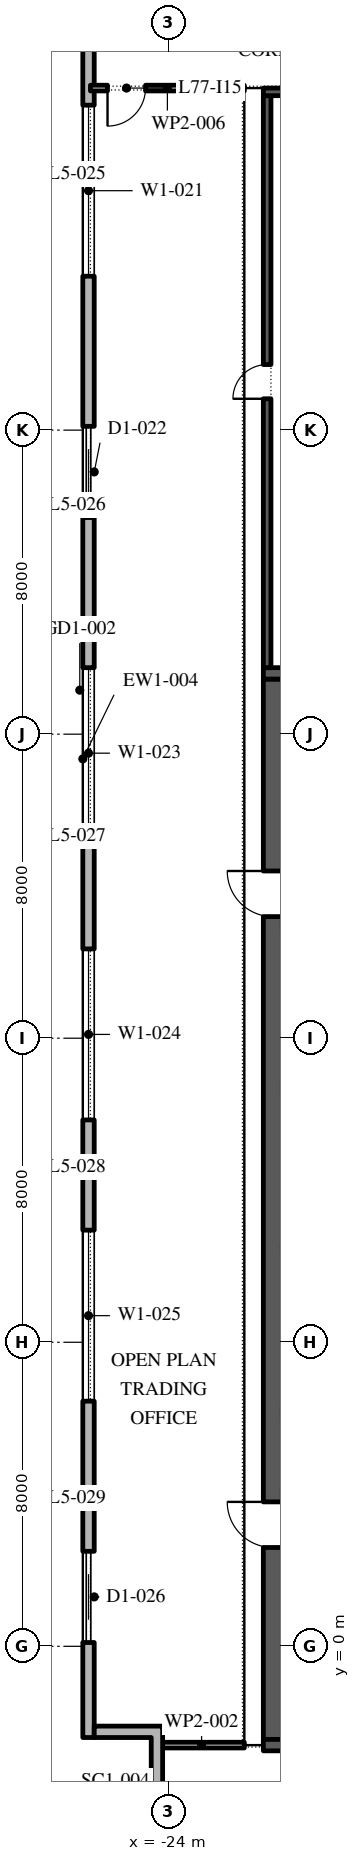
"""IFC4 building model, lengths in metres.
Left out: names, types, materials, properties, quantities, classifications, styles, units other than length and angle.
Written with IfcOpenShell. Run it as: python <this file> out.ifc"""

import sys

from ifc_helpers import new_model, si_unit, direction, frame, frame_2d, origin, place, context, subcontext, project, spatial, polyline, rectangle, outline, extrude, element, fill, save


model = new_model("IFC4")
c1 = context("Model", 3, precision=1e-05, world=origin(), true_north=direction((0.0, 1.0)))
c2 = subcontext(c1, "Body", "Model", "MODEL_VIEW")
j1 = project(units=[si_unit("LENGTHUNIT", "METRE"), si_unit("PLANEANGLEUNIT", "RADIAN")], contexts=[c1])
p1 = place(None, origin())
s1 = spatial("IfcSite", under=j1, at=p1, CompositionType="ELEMENT")
p2 = place(p1, origin())
s2 = spatial("IfcBuilding", under=s1, at=p2, CompositionType="ELEMENT")
p3 = place(p2, frame((0.0, 0.0, 351.0)))
s3 = spatial("IfcBuildingStorey", under=s2, at=p3, CompositionType="ELEMENT", Elevation=351.0)
p4 = place(p3, frame((-26.1, 49.1, 0.0), z_axis=(0.0, 0.0, 1.0), x_axis=(0.0, -1.0, 0.0)))
e1 = element("IfcWall", 1, at=p4, inside=s3, PredefinedType="STANDARD", context=c2, shape_type="SweptSolid", body=[
    extrude(rectangle(XDim=51.5, YDim=0.3, at=frame_2d((25.75, 0.0))), origin(), (0.0, 0.0, 1.0), 4.0),
])
p5 = place(p4, frame((1.3, 0.0, 0.45)))
e2 = element("IfcOpeningElement", 2, at=p5, cuts=e1, PredefinedType="OPENING", context=c2, shape_type="SweptSolid", body=[
    extrude(rectangle(XDim=4.5, YDim=3.05, at=frame_2d((2.25, 1.525))), frame((0.0, 0.16, 0.0), z_axis=(0.0, -1.0, 0.0), x_axis=(1.0, 0.0, 0.0)), (0.0, 0.0, 1.0), 0.32),
])
p6 = place(p4, frame((8.55, 0.0, 0.45)))
e3 = element("IfcOpeningElement", 3, at=p6, cuts=e1, PredefinedType="OPENING", context=c2, shape_type="SweptSolid", body=[
    extrude(rectangle(XDim=4.5, YDim=3.05, at=frame_2d((2.25, 1.525))), frame((0.0, 0.16, 0.0), z_axis=(0.0, -1.0, 0.0), x_axis=(1.0, 0.0, 0.0)), (0.0, 0.0, 1.0), 0.32),
])
p7 = place(p4, frame((17.0, 0.0, 0.0)))
e4 = element("IfcOpeningElement", 4, at=p7, cuts=e1, PredefinedType="OPENING", context=c2, shape_type="SweptSolid", body=[
    extrude(rectangle(XDim=2.4, YDim=3.5, at=frame_2d((1.2, 1.75))), frame((0.0, 0.16, 0.0), z_axis=(0.0, -1.0, 0.0), x_axis=(1.0, 0.0, 0.0)), (0.0, 0.0, 1.0), 0.32),
])
p8 = place(p4, frame((23.35, 0.0, 0.45)))
e5 = element("IfcOpeningElement", 5, at=p8, cuts=e1, PredefinedType="OPENING", context=c2, shape_type="SweptSolid", body=[
    extrude(rectangle(XDim=4.5, YDim=3.05, at=frame_2d((2.25, 1.525))), frame((0.0, 0.16, 0.0), z_axis=(0.0, -1.0, 0.0), x_axis=(1.0, 0.0, 0.0)), (0.0, 0.0, 1.0), 0.32),
])
p9 = place(p4, frame((30.75, 0.0, 0.45)))
e6 = element("IfcOpeningElement", 6, at=p9, cuts=e1, PredefinedType="OPENING", context=c2, shape_type="SweptSolid", body=[
    extrude(rectangle(XDim=4.5, YDim=3.05, at=frame_2d((2.25, 1.525))), frame((0.0, 0.16, 0.0), z_axis=(0.0, -1.0, 0.0), x_axis=(1.0, 0.0, 0.0)), (0.0, 0.0, 1.0), 0.32),
])
p10 = place(p4, frame((38.15, 0.0, 0.45)))
e7 = element("IfcOpeningElement", 7, at=p10, cuts=e1, PredefinedType="OPENING", context=c2, shape_type="SweptSolid", body=[
    extrude(rectangle(XDim=4.5, YDim=3.05, at=frame_2d((2.25, 1.525))), frame((0.0, 0.16, 0.0), z_axis=(0.0, -1.0, 0.0), x_axis=(1.0, 0.0, 0.0)), (0.0, 0.0, 1.0), 0.32),
])
p11 = place(p4, frame((46.6, 0.0, 0.0)))
e8 = element("IfcOpeningElement", 8, at=p11, cuts=e1, PredefinedType="OPENING", context=c2, shape_type="SweptSolid", body=[
    extrude(rectangle(XDim=2.4, YDim=3.5, at=frame_2d((1.2, 1.75))), frame((0.0, 0.16, 0.0), z_axis=(0.0, -1.0, 0.0), x_axis=(1.0, 0.0, 0.0)), (0.0, 0.0, 1.0), 0.32),
])
p12 = place(p3, origin())
e9 = element("IfcWall", 9, at=p12, inside=s3, PredefinedType="STANDARD", context=c2, shape_type="SweptSolid", body=[
    extrude(outline(polyline([(-22.65, -4.2), (-24.45, -4.2), (-24.45, -2.4), (-25.95, -2.4), (-25.95, -2.1), (-24.15, -2.1), (-24.15, -3.9), (-22.35, -3.9), (-22.35, -6.0), (-22.65, -6.0), (-22.65, -4.2)])), origin(), (0.0, 0.0, 1.0), 4.0),
])
p13 = place(p3, frame((-21.25, -2.45, 0.0), z_axis=(0.0, 0.0, 1.0), x_axis=(0.0, 1.0, 0.0)))
e10 = element("IfcWall", 10, at=p13, inside=s3, PredefinedType="SHEAR", context=c2, shape_type="SweptSolid", body=[
    extrude(rectangle(XDim=27.9, YDim=0.5, at=frame_2d((13.95, 0.0))), origin(), (0.0, 0.0, 1.0), 4.0),
])
p14 = place(p13, frame((5.05, 0.0, 0.0)))
e11 = element("IfcOpeningElement", 11, at=p14, cuts=e10, PredefinedType="OPENING", context=c2, shape_type="SweptSolid", body=[
    extrude(rectangle(XDim=1.2, YDim=2.1, at=frame_2d((0.6, 1.05))), frame((0.0, 0.26, 0.0), z_axis=(0.0, -1.0, 0.0), x_axis=(1.0, 0.0, 0.0)), (0.0, 0.0, 1.0), 0.52),
])
p15 = place(p13, frame((21.65, 0.0, 0.0)))
e12 = element("IfcOpeningElement", 12, at=p15, cuts=e10, PredefinedType="OPENING", context=c2, shape_type="SweptSolid", body=[
    extrude(rectangle(XDim=1.2, YDim=2.1, at=frame_2d((0.6, 1.05))), frame((0.0, 0.26, 0.0), z_axis=(0.0, -1.0, 0.0), x_axis=(1.0, 0.0, 0.0)), (0.0, 0.0, 1.0), 0.52),
])
for number, where, z_axis, x_axis in (
    (13, (-21.5, -2.6, 0.0), (0.0, 0.0, 1.0), (1.0, 0.0, 0.0)),
    (14, (-21.5, 25.6, 0.0), (0.0, 0.0, 1.0), (1.0, 0.0, 0.0)),
):
    element("IfcWall", number, at=place(p3, frame(where, z_axis=z_axis, x_axis=x_axis)), inside=s3, PredefinedType="SHEAR", context=c2, shape_type="SweptSolid", body=[
        extrude(rectangle(XDim=11.0, YDim=0.3, at=frame_2d((5.5, 0.0))), origin(), (0.0, 0.0, 1.0), 4.0),
    ])
p16 = place(p3, frame((-21.4, 25.75, 0.0), z_axis=(0.0, 0.0, 1.0), x_axis=(0.0, 1.0, 0.0)))
e15 = element("IfcWall", 15, at=p16, inside=s3, PredefinedType="SHEAR", context=c2, shape_type="SweptSolid", body=[
    extrude(rectangle(XDim=15.05, YDim=0.2, at=frame_2d((7.525, 0.0))), origin(), (0.0, 0.0, 1.0), 4.0),
])
p17 = place(p16, frame((7.075, 0.0, 0.0)))
e16 = element("IfcOpeningElement", 16, at=p17, cuts=e15, PredefinedType="OPENING", context=c2, shape_type="SweptSolid", body=[
    extrude(rectangle(XDim=0.9, YDim=2.1, at=frame_2d((0.45, 1.05))), frame((0.0, 0.11, 0.0), z_axis=(0.0, -1.0, 0.0), x_axis=(1.0, 0.0, 0.0)), (0.0, 0.0, 1.0), 0.22),
])
p18 = place(p3, frame((-21.5, 40.9, 0.0), z_axis=(0.0, 0.0, 1.0), x_axis=(1.0, 0.0, 0.0)))
e17 = element("IfcWall", 17, at=p18, inside=s3, PredefinedType="SHEAR", context=c2, shape_type="SweptSolid", body=[
    extrude(rectangle(XDim=11.0, YDim=0.2, at=frame_2d((5.5, 0.0))), origin(), (0.0, 0.0, 1.0), 4.0),
])
p19 = place(p3, frame((-24.25, -2.6, 0.0), z_axis=(0.0, 0.0, 1.0), x_axis=(1.0, 0.0, 0.0)))
e18 = element("IfcWall", 18, at=p19, inside=s3, PredefinedType="PARTITIONING", context=c2, shape_type="SweptSolid", body=[
    extrude(rectangle(XDim=2.25, YDim=0.15, at=frame_2d((1.125, 0.0))), origin(), (0.0, 0.0, 1.0), 4.0),
])
p20 = place(p3, frame((-22.0, 41.0, 0.0), z_axis=(0.0, 0.0, 1.0), x_axis=(-1.0, 0.0, 0.0)))
e19 = element("IfcWall", 19, at=p20, inside=s3, PredefinedType="PARTITIONING", context=c2, shape_type="SweptSolid", body=[
    extrude(rectangle(XDim=4.05, YDim=0.15, at=frame_2d((2.025, 0.0))), origin(), (0.0, 0.0, 1.0), 4.0),
])
p21 = place(p20, frame((2.6, 0.0, 0.0)))
e20 = element("IfcOpeningElement", 20, at=p21, cuts=e19, PredefinedType="OPENING", context=c2, shape_type="SweptSolid", body=[
    extrude(rectangle(XDim=1.0, YDim=2.1, at=frame_2d((0.5, 1.05))), frame((0.0, 0.085, 0.0), z_axis=(0.0, -1.0, 0.0), x_axis=(1.0, 0.0, 0.0)), (0.0, 0.0, 1.0), 0.17),
])
p22 = place(p6, origin())
e21 = element("IfcWindow", 21, at=p22, inside=s3, PartitioningType="DOUBLE_PANEL_VERTICAL", PredefinedType="WINDOW", context=c2, shape_type="SweptSolid", body=[
    extrude(rectangle(XDim=4.5, YDim=3.05, at=frame_2d((2.25, 1.525))), frame((0.0, 0.03, 0.0), z_axis=(0.0, -1.0, 0.0), x_axis=(1.0, 0.0, 0.0)), (0.0, 0.0, 1.0), 0.06),
])
fill(e3, e21)
p23 = place(p7, origin())
e22 = element("IfcDoor", 22, at=p23, inside=s3, OperationType="DOUBLE_DOOR_SLIDING", PredefinedType="DOOR", context=c2, shape_type="SweptSolid", body=[
    extrude(rectangle(XDim=2.4, YDim=3.5, at=frame_2d((1.2, 1.75))), frame((0.0, 0.025, 0.0), z_axis=(0.0, -1.0, 0.0), x_axis=(1.0, 0.0, 0.0)), (0.0, 0.0, 1.0), 0.05),
])
fill(e4, e22)
p24 = place(p8, origin())
e23 = element("IfcWindow", 23, at=p24, inside=s3, PartitioningType="DOUBLE_PANEL_VERTICAL", PredefinedType="WINDOW", context=c2, shape_type="SweptSolid", body=[
    extrude(rectangle(XDim=4.5, YDim=3.05, at=frame_2d((2.25, 1.525))), frame((0.0, 0.03, 0.0), z_axis=(0.0, -1.0, 0.0), x_axis=(1.0, 0.0, 0.0)), (0.0, 0.0, 1.0), 0.06),
])
fill(e5, e23)
p25 = place(p9, origin())
e24 = element("IfcWindow", 24, at=p25, inside=s3, PartitioningType="DOUBLE_PANEL_VERTICAL", PredefinedType="WINDOW", context=c2, shape_type="SweptSolid", body=[
    extrude(rectangle(XDim=4.5, YDim=3.05, at=frame_2d((2.25, 1.525))), frame((0.0, 0.03, 0.0), z_axis=(0.0, -1.0, 0.0), x_axis=(1.0, 0.0, 0.0)), (0.0, 0.0, 1.0), 0.06),
])
fill(e6, e24)
p26 = place(p10, origin())
e25 = element("IfcWindow", 25, at=p26, inside=s3, PartitioningType="DOUBLE_PANEL_VERTICAL", PredefinedType="WINDOW", context=c2, shape_type="SweptSolid", body=[
    extrude(rectangle(XDim=4.5, YDim=3.05, at=frame_2d((2.25, 1.525))), frame((0.0, 0.03, 0.0), z_axis=(0.0, -1.0, 0.0), x_axis=(1.0, 0.0, 0.0)), (0.0, 0.0, 1.0), 0.06),
])
fill(e7, e25)
p27 = place(p11, origin())
e26 = element("IfcDoor", 26, at=p27, inside=s3, OperationType="DOUBLE_DOOR_SLIDING", PredefinedType="DOOR", context=c2, shape_type="SweptSolid", body=[
    extrude(rectangle(XDim=2.4, YDim=3.5, at=frame_2d((1.2, 1.75))), frame((0.0, 0.025, 0.0), z_axis=(0.0, -1.0, 0.0), x_axis=(1.0, 0.0, 0.0)), (0.0, 0.0, 1.0), 0.05),
])
fill(e8, e26)
p28 = place(p14, origin())
e27 = element("IfcDoor", 27, at=p28, inside=s3, OperationType="SINGLE_SWING_LEFT", PredefinedType="DOOR", context=c2, shape_type="SweptSolid", body=[
    extrude(rectangle(XDim=1.2, YDim=2.1, at=frame_2d((0.6, 1.05))), frame((0.0, 0.025, 0.0), z_axis=(0.0, -1.0, 0.0), x_axis=(1.0, 0.0, 0.0)), (0.0, 0.0, 1.0), 0.05),
])
fill(e11, e27)
p29 = place(p15, origin())
e28 = element("IfcDoor", 28, at=p29, inside=s3, OperationType="SINGLE_SWING_LEFT", PredefinedType="DOOR", context=c2, shape_type="SweptSolid", body=[
    extrude(rectangle(XDim=1.2, YDim=2.1, at=frame_2d((0.6, 1.05))), frame((0.0, 0.025, 0.0), z_axis=(0.0, -1.0, 0.0), x_axis=(1.0, 0.0, 0.0)), (0.0, 0.0, 1.0), 0.05),
])
fill(e12, e28)
p30 = place(p17, origin())
e29 = element("IfcDoor", 29, at=p30, inside=s3, OperationType="SINGLE_SWING_RIGHT", PredefinedType="DOOR", context=c2, shape_type="SweptSolid", body=[
    extrude(rectangle(XDim=0.9, YDim=2.1, at=frame_2d((0.45, 1.05))), frame((0.0, -0.05, 0.0), z_axis=(0.0, -1.0, 0.0), x_axis=(1.0, 0.0, 0.0)), (0.0, 0.0, 1.0), 0.05),
])
fill(e16, e29)
p31 = place(p21, origin())
e30 = element("IfcDoor", 30, at=p31, inside=s3, OperationType="SINGLE_SWING_LEFT", PredefinedType="DOOR", context=c2, shape_type="SweptSolid", body=[
    extrude(rectangle(XDim=1.0, YDim=2.1, at=frame_2d((0.5, 1.05))), frame((0.0, 0.025, 0.0), z_axis=(0.0, -1.0, 0.0), x_axis=(1.0, 0.0, 0.0)), (0.0, 0.0, 1.0), 0.05),
])
fill(e20, e30)
save(model, sys.argv[1])
